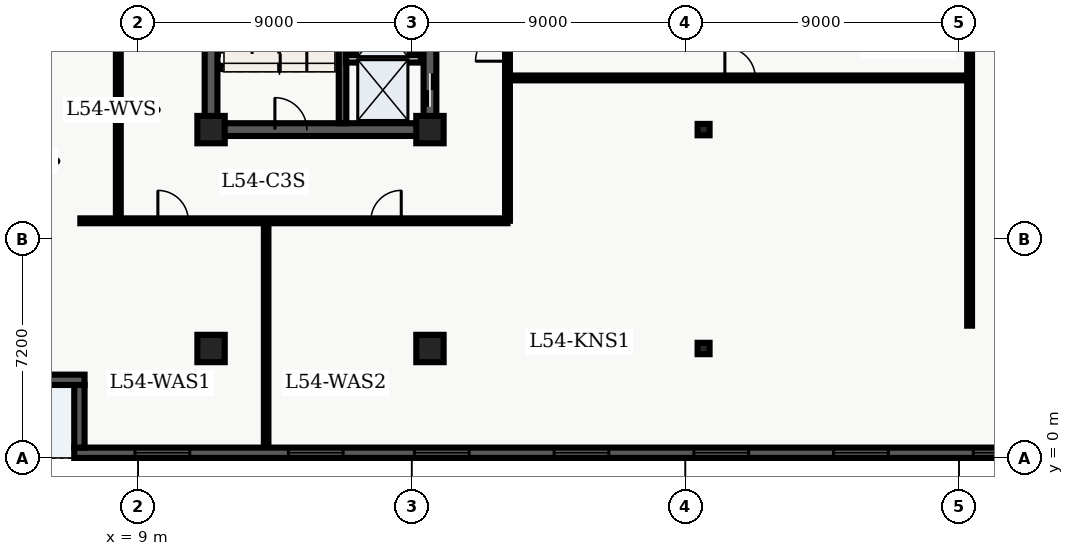
"""IFC4 building model, lengths in metres.
Left out: names, types, materials, properties, quantities, classifications, styles, units other than length and angle.
Written with IfcOpenShell. Run it as: python <this file> out.ifc"""

import sys

from ifc_helpers import new_model, entity, si_unit, converted_unit, direction, frame, origin_with_axes, origin_2d_with_axis, place, context, subcontext, project, spatial, polyline, rectangle, i_section, outline, extrude, element, fill, save


model = new_model("IFC4")
c1 = context("Model", 3, precision=1e-05, world=origin_with_axes(), true_north=direction((0.0, 1.0)))
c2 = subcontext(c1, "Body", "Model", "MODEL_VIEW")
j1 = project(units=[si_unit("LENGTHUNIT", "METRE"), converted_unit("PLANEANGLEUNIT", "DEGREE", entity("IfcPlaneAngleMeasure", 0.017), si_unit("PLANEANGLEUNIT", "RADIAN"), dimensions=[0, 0, 0, 0, 0, 0, 0])], contexts=[c1])
p1 = place(None, origin_with_axes())
s1 = spatial("IfcSite", under=j1, at=p1, CompositionType="ELEMENT")
p2 = place(p1, origin_with_axes())
s2 = spatial("IfcBuilding", under=s1, at=p2, CompositionType="ELEMENT")
p3 = place(p2, frame((0.0, 0.0, 219.9), z_axis=(0.0, 0.0, 1.0), x_axis=(1.0, 0.0, 0.0)))
s3 = spatial("IfcBuildingStorey", under=s2, at=p3, CompositionType="ELEMENT", Elevation=219.9)
p4 = place(p3, frame((11.4, 10.8, 0.0), z_axis=(0.0, 0.0, 1.0), x_axis=(0.0, 1.0, 0.0)))
e1 = element("IfcWall", 1, at=p4, inside=s3, PredefinedType="SHEAR", context=c2, shape_type="SweptSolid", body=[
    extrude(outline(polyline([(0.0, -0.21), (27.0, -0.21), (27.0, 0.21), (0.0, 0.21), (0.0, -0.21)])), origin_with_axes(), (0.0, 0.0, 1.0), 4.56),
])
p5 = place(p3, frame((11.4, 10.8, 0.0), z_axis=(0.0, 0.0, 1.0), x_axis=(1.0, 0.0, 0.0)))
e2 = element("IfcWall", 2, at=p5, inside=s3, PredefinedType="SHEAR", context=c2, shape_type="SweptSolid", body=[
    extrude(outline(polyline([(0.0, -0.21), (7.2, -0.21), (7.2, 0.21), (0.0, 0.21), (0.0, -0.21)])), origin_with_axes(), (0.0, 0.0, 1.0), 4.56),
])
p6 = place(p5, frame((2.625, 0.0, 0.0), z_axis=(0.0, 0.0, 1.0), x_axis=(1.0, 0.0, 0.0)))
e3 = element("IfcOpeningElement", 3, at=p6, cuts=e2, PredefinedType="OPENING", context=c2, shape_type="SweptSolid", body=[
    extrude(rectangle(XDim=1.05, YDim=0.44, at=origin_2d_with_axis()), origin_with_axes(), (0.0, 0.0, 1.0), 2.15),
])
p7 = place(p3, frame((18.6, 10.8, 0.0), z_axis=(0.0, 0.0, 1.0), x_axis=(0.0, 1.0, 0.0)))
e4 = element("IfcWall", 4, at=p7, inside=s3, PredefinedType="SHEAR", context=c2, shape_type="SweptSolid", body=[
    extrude(outline(polyline([(0.0, -0.21), (13.5, -0.21), (13.5, 0.21), (0.0, 0.21), (0.0, -0.21)])), origin_with_axes(), (0.0, 0.0, 1.0), 4.56),
])
p8 = place(p7, frame((1.3, 0.0, 0.0), z_axis=(0.0, 0.0, 1.0), x_axis=(1.0, 0.0, 0.0)))
e5 = element("IfcOpeningElement", 5, at=p8, cuts=e4, PredefinedType="OPENING", context=c2, shape_type="SweptSolid", body=[
    extrude(rectangle(XDim=1.1, YDim=0.44, at=origin_2d_with_axis()), origin_with_axes(), (0.0, 0.0, 1.0), 2.15),
])
p9 = place(p7, frame((3.4, 0.0, 0.0), z_axis=(0.0, 0.0, 1.0), x_axis=(1.0, 0.0, 0.0)))
e6 = element("IfcOpeningElement", 6, at=p9, cuts=e4, PredefinedType="OPENING", context=c2, shape_type="SweptSolid", body=[
    extrude(rectangle(XDim=1.1, YDim=0.44, at=origin_2d_with_axis()), origin_with_axes(), (0.0, 0.0, 1.0), 2.15),
])
p10 = place(p7, frame((11.125, 0.0, 0.0), z_axis=(0.0, 0.0, 1.0), x_axis=(1.0, 0.0, 0.0)))
e7 = element("IfcOpeningElement", 7, at=p10, cuts=e4, PredefinedType="OPENING", context=c2, shape_type="SweptSolid", body=[
    extrude(rectangle(XDim=1.05, YDim=0.44, at=origin_2d_with_axis()), origin_with_axes(), (0.0, 0.0, 1.0), 2.15),
])
p11 = place(p7, frame((6.675, 0.0, 0.0), z_axis=(0.0, 0.0, 1.0), x_axis=(1.0, 0.0, 0.0)))
e8 = element("IfcOpeningElement", 8, at=p11, cuts=e4, PredefinedType="OPENING", context=c2, shape_type="SweptSolid", body=[
    extrude(rectangle(XDim=0.95, YDim=0.44, at=origin_2d_with_axis()), origin_with_axes(), (0.0, 0.0, 1.0), 2.15),
])
p12 = place(p3, frame((15.725, 11.01, 0.0), z_axis=(0.0, 0.0, 1.0), x_axis=(0.0, 1.0, 0.0)))
e9 = element("IfcWall", 9, at=p12, inside=s3, PredefinedType="SHEAR", context=c2, shape_type="SweptSolid", body=[
    extrude(outline(polyline([(0.0, -0.125), (8.69, -0.125), (8.69, 0.125), (0.0, 0.125), (0.0, -0.125)])), origin_with_axes(), (0.0, 0.0, 1.0), 4.56),
])
for number, where, z_axis, x_axis in (
    (10, (11.4, 3.6, 0.0), (0.0, 0.0, 1.0), (1.0, 0.0, 0.0)),
    (11, (11.4, 10.8, 0.0), (0.0, 0.0, 1.0), (1.0, 0.0, 0.0)),
    (12, (18.6, 3.6, 0.0), (0.0, 0.0, 1.0), (1.0, 0.0, 0.0)),
    (13, (18.6, 10.8, 0.0), (0.0, 0.0, 1.0), (1.0, 0.0, 0.0)),
):
    element("IfcColumn", number, at=place(p3, frame(where, z_axis=z_axis, x_axis=x_axis)), inside=s3, PredefinedType="COLUMN", context=c2, shape_type="SweptSolid", body=[
        extrude(rectangle(XDim=0.9, YDim=0.9, at=origin_2d_with_axis()), origin_with_axes(), (0.0, 0.0, 1.0), 4.8),
    ])
for number, where, z_axis, x_axis in (
    (14, (27.6, 3.6, 0.0), (0.0, 0.0, 1.0), (1.0, 0.0, 0.0)),
    (15, (27.6, 10.8, 0.0), (0.0, 0.0, 1.0), (1.0, 0.0, 0.0)),
):
    element("IfcColumn", number, at=place(p3, frame(where, z_axis=z_axis, x_axis=x_axis)), inside=s3, PredefinedType="COLUMN", context=c2, shape_type="SweptSolid", body=[
        extrude(i_section(OverallWidth=0.394, OverallDepth=0.375, WebThickness=0.017, FlangeThickness=0.028, FilletRadius=0.02, at=origin_2d_with_axis()), origin_with_axes(), (0.0, 0.0, 1.0), 4.8),
    ])
p13 = place(p3, frame((15.84, 13.13, 0.0), z_axis=(0.0, 0.0, 1.0), x_axis=(1.0, 0.0, 0.0)))
e16 = element("IfcWall", 16, at=p13, inside=s3, PredefinedType="SOLIDWALL", context=c2, shape_type="SweptSolid", body=[
    extrude(outline(polyline([(0.0, -0.125), (2.46, -0.125), (2.46, 0.125), (0.0, 0.125), (0.0, -0.125)])), origin_with_axes(), (0.0, 0.0, 1.0), 3.2),
])
p14 = place(p3, frame((7.1, 7.8, 0.0), z_axis=(0.0, 0.0, 1.0), x_axis=(1.0, 0.0, 0.0)))
e17 = element("IfcWall", 17, at=p14, inside=s3, PredefinedType="PARTITIONING", context=c2, shape_type="SweptSolid", body=[
    extrude(outline(polyline([(0.0, -0.08), (14.05, -0.08), (14.05, 0.08), (0.0, 0.08), (0.0, -0.08)])), origin_with_axes(), (0.0, 0.0, 1.0), 3.2),
])
p15 = place(p14, frame((3.051, 0.0, 0.0), z_axis=(0.0, 0.0, 1.0), x_axis=(1.0, 0.0, 0.0)))
e18 = element("IfcOpeningElement", 18, at=p15, cuts=e17, PredefinedType="OPENING", context=c2, shape_type="SweptSolid", body=[
    extrude(rectangle(XDim=1.0, YDim=0.18, at=origin_2d_with_axis()), origin_with_axes(), (0.0, 0.0, 1.0), 2.15),
])
p16 = place(p14, frame((10.056, 0.0, 0.0), z_axis=(0.0, 0.0, 1.0), x_axis=(1.0, 0.0, 0.0)))
e19 = element("IfcOpeningElement", 19, at=p16, cuts=e17, PredefinedType="OPENING", context=c2, shape_type="SweptSolid", body=[
    extrude(rectangle(XDim=1.0, YDim=0.18, at=origin_2d_with_axis()), origin_with_axes(), (0.0, 0.0, 1.0), 2.15),
])
p17 = place(p3, frame((21.15, 7.8, 0.0), z_axis=(0.0, 0.0, 1.0), x_axis=(0.0, 1.0, 0.0)))
e20 = element("IfcWall", 20, at=p17, inside=s3, PredefinedType="PARTITIONING", context=c2, shape_type="SweptSolid", body=[
    extrude(outline(polyline([(0.0, -0.08), (32.7, -0.08), (32.7, 0.08), (0.0, 0.08), (0.0, -0.08)])), origin_with_axes(), (0.0, 0.0, 1.0), 3.2),
])
p18 = place(p17, frame((18.032, 0.0, 0.0), z_axis=(0.0, 0.0, 1.0), x_axis=(1.0, 0.0, 0.0)))
e21 = element("IfcOpeningElement", 21, at=p18, cuts=e20, PredefinedType="OPENING", context=c2, shape_type="SweptSolid", body=[
    extrude(rectangle(XDim=1.0, YDim=0.18, at=origin_2d_with_axis()), origin_with_axes(), (0.0, 0.0, 1.0), 2.15),
])
p19 = place(p17, frame((27.352, 0.0, 0.0), z_axis=(0.0, 0.0, 1.0), x_axis=(1.0, 0.0, 0.0)))
e22 = element("IfcOpeningElement", 22, at=p19, cuts=e20, PredefinedType="OPENING", context=c2, shape_type="SweptSolid", body=[
    extrude(rectangle(XDim=1.0, YDim=0.18, at=origin_2d_with_axis()), origin_with_axes(), (0.0, 0.0, 1.0), 2.15),
])
p20 = place(p17, frame((5.775, 0.0, 0.0), z_axis=(0.0, 0.0, 1.0), x_axis=(1.0, 0.0, 0.0)))
e23 = element("IfcOpeningElement", 23, at=p20, cuts=e20, PredefinedType="OPENING", context=c2, shape_type="SweptSolid", body=[
    extrude(rectangle(XDim=1.05, YDim=0.18, at=origin_2d_with_axis()), origin_with_axes(), (0.0, 0.0, 1.0), 2.15),
])
p21 = place(p3, frame((8.35, 7.8, 0.0), z_axis=(0.0, 0.0, 1.0), x_axis=(0.0, 1.0, 0.0)))
e24 = element("IfcWall", 24, at=p21, inside=s3, PredefinedType="PARTITIONING", context=c2, shape_type="SweptSolid", body=[
    extrude(outline(polyline([(0.0, -0.08), (12.6, -0.08), (12.6, 0.08), (0.0, 0.08), (0.0, -0.08)])), origin_with_axes(), (0.0, 0.0, 1.0), 3.2),
])
p22 = place(p21, frame((6.325, 0.0, 0.0), z_axis=(0.0, 0.0, 1.0), x_axis=(1.0, 0.0, 0.0)))
e25 = element("IfcOpeningElement", 25, at=p22, cuts=e24, PredefinedType="OPENING", context=c2, shape_type="SweptSolid", body=[
    extrude(rectangle(XDim=1.0, YDim=0.18, at=origin_2d_with_axis()), origin_with_axes(), (0.0, 0.0, 1.0), 2.15),
])
p23 = place(p3, frame((13.212, 0.335, 0.0), z_axis=(0.0, 0.0, 1.0), x_axis=(0.0, 1.0, 0.0)))
e26 = element("IfcWall", 26, at=p23, inside=s3, PredefinedType="PARTITIONING", context=c2, shape_type="SweptSolid", body=[
    extrude(outline(polyline([(0.0, -0.075), (7.365, -0.075), (7.365, 0.075), (0.0, 0.075), (0.0, -0.075)])), origin_with_axes(), (0.0, 0.0, 1.0), 3.2),
])
p24 = place(p3, frame((21.15, 12.5, 0.0), z_axis=(0.0, 0.0, 1.0), x_axis=(1.0, 0.0, 0.0)))
e27 = element("IfcWall", 27, at=p24, inside=s3, PredefinedType="PARTITIONING", context=c2, shape_type="SweptSolid", body=[
    extrude(outline(polyline([(0.0, -0.08), (15.2, -0.08), (15.2, 0.08), (0.0, 0.08), (0.0, -0.08)])), origin_with_axes(), (0.0, 0.0, 1.0), 3.2),
])
p25 = place(p24, frame((7.65, 0.0, 0.0), z_axis=(0.0, 0.0, 1.0), x_axis=(1.0, 0.0, 0.0)))
e28 = element("IfcOpeningElement", 28, at=p25, cuts=e27, PredefinedType="OPENING", context=c2, shape_type="SweptSolid", body=[
    extrude(rectangle(XDim=1.0, YDim=0.18, at=origin_2d_with_axis()), origin_with_axes(), (0.0, 0.0, 1.0), 2.15),
])
p26 = place(p3, frame((36.35, 4.35, 0.0), z_axis=(0.0, 0.0, 1.0), x_axis=(0.0, 1.0, 0.0)))
e29 = element("IfcWall", 29, at=p26, inside=s3, PredefinedType="PARTITIONING", context=c2, shape_type="SweptSolid", body=[
    extrude(outline(polyline([(0.0, -0.08), (16.95, -0.08), (16.95, 0.08), (0.0, 0.08), (0.0, -0.08)])), origin_with_axes(), (0.0, 0.0, 1.0), 3.2),
])
p27 = place(p3, frame((49.46, 0.17, 0.0), z_axis=(0.0, 0.0, 1.0), x_axis=(-1.0, 0.0, 0.0)))
e30 = element("IfcWall", 30, at=p27, inside=s3, PredefinedType="SOLIDWALL", context=c2, shape_type="SweptSolid", body=[
    extrude(outline(polyline([(0.0, -0.17), (42.56, -0.17), (42.56, 0.17), (0.0, 0.17), (0.0, -0.17)])), origin_with_axes(), (0.0, 0.0, 1.0), 4.56),
])
p28 = place(p27, frame((2.898, 0.0, 0.45), z_axis=(0.0, 0.0, 1.0), x_axis=(1.0, 0.0, 0.0)))
e31 = element("IfcOpeningElement", 31, at=p28, cuts=e30, PredefinedType="OPENING", context=c2, shape_type="SweptSolid", body=[
    extrude(rectangle(XDim=1.8, YDim=0.36, at=origin_2d_with_axis()), origin_with_axes(), (0.0, 0.0, 1.0), 2.1),
])
p29 = place(p27, frame((7.493, 0.0, 0.45), z_axis=(0.0, 0.0, 1.0), x_axis=(1.0, 0.0, 0.0)))
e32 = element("IfcOpeningElement", 32, at=p29, cuts=e30, PredefinedType="OPENING", context=c2, shape_type="SweptSolid", body=[
    extrude(rectangle(XDim=1.8, YDim=0.36, at=origin_2d_with_axis()), origin_with_axes(), (0.0, 0.0, 1.0), 2.1),
])
p30 = place(p27, frame((12.089, 0.0, 0.45), z_axis=(0.0, 0.0, 1.0), x_axis=(1.0, 0.0, 0.0)))
e33 = element("IfcOpeningElement", 33, at=p30, cuts=e30, PredefinedType="OPENING", context=c2, shape_type="SweptSolid", body=[
    extrude(rectangle(XDim=1.8, YDim=0.36, at=origin_2d_with_axis()), origin_with_axes(), (0.0, 0.0, 1.0), 2.1),
])
p31 = place(p27, frame((16.684, 0.0, 0.45), z_axis=(0.0, 0.0, 1.0), x_axis=(1.0, 0.0, 0.0)))
e34 = element("IfcOpeningElement", 34, at=p31, cuts=e30, PredefinedType="OPENING", context=c2, shape_type="SweptSolid", body=[
    extrude(rectangle(XDim=1.8, YDim=0.36, at=origin_2d_with_axis()), origin_with_axes(), (0.0, 0.0, 1.0), 2.1),
])
p32 = place(p27, frame((21.28, 0.0, 0.45), z_axis=(0.0, 0.0, 1.0), x_axis=(1.0, 0.0, 0.0)))
e35 = element("IfcOpeningElement", 35, at=p32, cuts=e30, PredefinedType="OPENING", context=c2, shape_type="SweptSolid", body=[
    extrude(rectangle(XDim=1.8, YDim=0.36, at=origin_2d_with_axis()), origin_with_axes(), (0.0, 0.0, 1.0), 2.1),
])
p33 = place(p27, frame((25.876, 0.0, 0.45), z_axis=(0.0, 0.0, 1.0), x_axis=(1.0, 0.0, 0.0)))
e36 = element("IfcOpeningElement", 36, at=p33, cuts=e30, PredefinedType="OPENING", context=c2, shape_type="SweptSolid", body=[
    extrude(rectangle(XDim=1.8, YDim=0.36, at=origin_2d_with_axis()), origin_with_axes(), (0.0, 0.0, 1.0), 2.1),
])
p34 = place(p27, frame((30.471, 0.0, 0.45), z_axis=(0.0, 0.0, 1.0), x_axis=(1.0, 0.0, 0.0)))
e37 = element("IfcOpeningElement", 37, at=p34, cuts=e30, PredefinedType="OPENING", context=c2, shape_type="SweptSolid", body=[
    extrude(rectangle(XDim=1.8, YDim=0.36, at=origin_2d_with_axis()), origin_with_axes(), (0.0, 0.0, 1.0), 2.1),
])
p35 = place(p27, frame((34.617, 0.0, 0.45), z_axis=(0.0, 0.0, 1.0), x_axis=(1.0, 0.0, 0.0)))
e38 = element("IfcOpeningElement", 38, at=p35, cuts=e30, PredefinedType="OPENING", context=c2, shape_type="SweptSolid", body=[
    extrude(rectangle(XDim=1.8, YDim=0.36, at=origin_2d_with_axis()), origin_with_axes(), (0.0, 0.0, 1.0), 2.1),
])
p36 = place(p27, frame((39.662, 0.0, 0.45), z_axis=(0.0, 0.0, 1.0), x_axis=(1.0, 0.0, 0.0)))
e39 = element("IfcOpeningElement", 39, at=p36, cuts=e30, PredefinedType="OPENING", context=c2, shape_type="SweptSolid", body=[
    extrude(rectangle(XDim=1.8, YDim=0.36, at=origin_2d_with_axis()), origin_with_axes(), (0.0, 0.0, 1.0), 2.1),
])
p37 = place(p3, frame((7.07, 0.34, 0.0), z_axis=(0.0, 0.0, 1.0), x_axis=(0.0, 1.0, 0.0)))
e40 = element("IfcWall", 40, at=p37, inside=s3, PredefinedType="SOLIDWALL", context=c2, shape_type="SweptSolid", body=[
    extrude(outline(polyline([(0.0, -0.17), (2.06, -0.17), (2.06, 0.17), (0.0, 0.17), (0.0, -0.17)])), origin_with_axes(), (0.0, 0.0, 1.0), 4.56),
])
p38 = place(p3, frame((7.24, 2.57, 0.0), z_axis=(0.0, 0.0, 1.0), x_axis=(-1.0, 0.0, 0.0)))
e41 = element("IfcWall", 41, at=p38, inside=s3, PredefinedType="SOLIDWALL", context=c2, shape_type="SweptSolid", body=[
    extrude(outline(polyline([(0.0, -0.17), (2.74, -0.17), (2.74, 0.17), (0.0, 0.17), (0.0, -0.17)])), origin_with_axes(), (0.0, 0.0, 1.0), 4.56),
])
p39 = place(p7, frame((1.3, 0.0, 0.0), z_axis=(0.0, 0.0, 1.0), x_axis=(1.0, 0.0, 0.0)))
e42 = element("IfcDoor", 42, at=p39, inside=s3, OperationType="SLIDING_TO_LEFT", PredefinedType="DOOR", context=c2, shape_type="SweptSolid", body=[
    extrude(rectangle(XDim=1.1, YDim=0.09, at=origin_2d_with_axis()), origin_with_axes(), (0.0, 0.0, 1.0), 2.15),
])
fill(e5, e42)
p40 = place(p5, frame((2.625, 0.0, 0.0), z_axis=(0.0, 0.0, 1.0), x_axis=(1.0, 0.0, 0.0)))
e43 = element("IfcDoor", 43, at=p40, inside=s3, OperationType="SINGLE_SWING_LEFT", PredefinedType="DOOR", context=c2, shape_type="SweptSolid", body=[
    extrude(rectangle(XDim=1.05, YDim=0.09, at=origin_2d_with_axis()), origin_with_axes(), (0.0, 0.0, 1.0), 2.15),
])
fill(e3, e43)
p41 = place(p14, frame((3.051, 0.0, 0.0), z_axis=(0.0, 0.0, 1.0), x_axis=(1.0, 0.0, 0.0)))
e44 = element("IfcDoor", 44, at=p41, inside=s3, OperationType="SINGLE_SWING_LEFT", PredefinedType="DOOR", context=c2, shape_type="SweptSolid", body=[
    extrude(rectangle(XDim=1.0, YDim=0.09, at=origin_2d_with_axis()), origin_with_axes(), (0.0, 0.0, 1.0), 2.15),
])
fill(e18, e44)
p42 = place(p14, frame((10.056, 0.0, 0.0), z_axis=(0.0, 0.0, 1.0), x_axis=(1.0, 0.0, 0.0)))
e45 = element("IfcDoor", 45, at=p42, inside=s3, OperationType="SINGLE_SWING_RIGHT", PredefinedType="DOOR", context=c2, shape_type="SweptSolid", body=[
    extrude(rectangle(XDim=1.0, YDim=0.09, at=origin_2d_with_axis()), origin_with_axes(), (0.0, 0.0, 1.0), 2.15),
])
fill(e19, e45)
p43 = place(p17, frame((5.775, 0.0, 0.0), z_axis=(0.0, 0.0, 1.0), x_axis=(1.0, 0.0, 0.0)))
e46 = element("IfcDoor", 46, at=p43, inside=s3, OperationType="SINGLE_SWING_LEFT", PredefinedType="DOOR", context=c2, shape_type="SweptSolid", body=[
    extrude(rectangle(XDim=1.05, YDim=0.09, at=origin_2d_with_axis()), origin_with_axes(), (0.0, 0.0, 1.0), 2.15),
])
fill(e23, e46)
p44 = place(p24, frame((7.65, 0.0, 0.0), z_axis=(0.0, 0.0, 1.0), x_axis=(1.0, 0.0, 0.0)))
e47 = element("IfcDoor", 47, at=p44, inside=s3, OperationType="SINGLE_SWING_LEFT", PredefinedType="DOOR", context=c2, shape_type="SweptSolid", body=[
    extrude(rectangle(XDim=1.0, YDim=0.09, at=origin_2d_with_axis()), origin_with_axes(), (0.0, 0.0, 1.0), 2.15),
])
fill(e28, e47)
p45 = place(p27, frame((12.089, 0.0, 0.45), z_axis=(0.0, 0.0, 1.0), x_axis=(1.0, 0.0, 0.0)))
e48 = element("IfcWindow", 48, at=p45, inside=s3, PredefinedType="WINDOW", context=c2, shape_type="SweptSolid", body=[
    extrude(rectangle(XDim=1.8, YDim=0.09, at=origin_2d_with_axis()), origin_with_axes(), (0.0, 0.0, 1.0), 2.1),
])
fill(e33, e48)
p46 = place(p27, frame((16.684, 0.0, 0.45), z_axis=(0.0, 0.0, 1.0), x_axis=(1.0, 0.0, 0.0)))
e49 = element("IfcWindow", 49, at=p46, inside=s3, PredefinedType="WINDOW", context=c2, shape_type="SweptSolid", body=[
    extrude(rectangle(XDim=1.8, YDim=0.09, at=origin_2d_with_axis()), origin_with_axes(), (0.0, 0.0, 1.0), 2.1),
])
fill(e34, e49)
p47 = place(p27, frame((21.28, 0.0, 0.45), z_axis=(0.0, 0.0, 1.0), x_axis=(1.0, 0.0, 0.0)))
e50 = element("IfcWindow", 50, at=p47, inside=s3, PredefinedType="WINDOW", context=c2, shape_type="SweptSolid", body=[
    extrude(rectangle(XDim=1.8, YDim=0.09, at=origin_2d_with_axis()), origin_with_axes(), (0.0, 0.0, 1.0), 2.1),
])
fill(e35, e50)
p48 = place(p27, frame((25.876, 0.0, 0.45), z_axis=(0.0, 0.0, 1.0), x_axis=(1.0, 0.0, 0.0)))
e51 = element("IfcWindow", 51, at=p48, inside=s3, PredefinedType="WINDOW", context=c2, shape_type="SweptSolid", body=[
    extrude(rectangle(XDim=1.8, YDim=0.09, at=origin_2d_with_axis()), origin_with_axes(), (0.0, 0.0, 1.0), 2.1),
])
fill(e36, e51)
p49 = place(p27, frame((30.471, 0.0, 0.45), z_axis=(0.0, 0.0, 1.0), x_axis=(1.0, 0.0, 0.0)))
e52 = element("IfcWindow", 52, at=p49, inside=s3, PredefinedType="WINDOW", context=c2, shape_type="SweptSolid", body=[
    extrude(rectangle(XDim=1.8, YDim=0.09, at=origin_2d_with_axis()), origin_with_axes(), (0.0, 0.0, 1.0), 2.1),
])
fill(e37, e52)
p50 = place(p27, frame((34.617, 0.0, 0.45), z_axis=(0.0, 0.0, 1.0), x_axis=(1.0, 0.0, 0.0)))
e53 = element("IfcWindow", 53, at=p50, inside=s3, PredefinedType="WINDOW", context=c2, shape_type="SweptSolid", body=[
    extrude(rectangle(XDim=1.8, YDim=0.09, at=origin_2d_with_axis()), origin_with_axes(), (0.0, 0.0, 1.0), 2.1),
])
fill(e38, e53)
p51 = place(p27, frame((39.662, 0.0, 0.45), z_axis=(0.0, 0.0, 1.0), x_axis=(1.0, 0.0, 0.0)))
e54 = element("IfcWindow", 54, at=p51, inside=s3, PredefinedType="WINDOW", context=c2, shape_type="SweptSolid", body=[
    extrude(rectangle(XDim=1.8, YDim=0.09, at=origin_2d_with_axis()), origin_with_axes(), (0.0, 0.0, 1.0), 2.1),
])
fill(e39, e54)
save(model, sys.argv[1])
